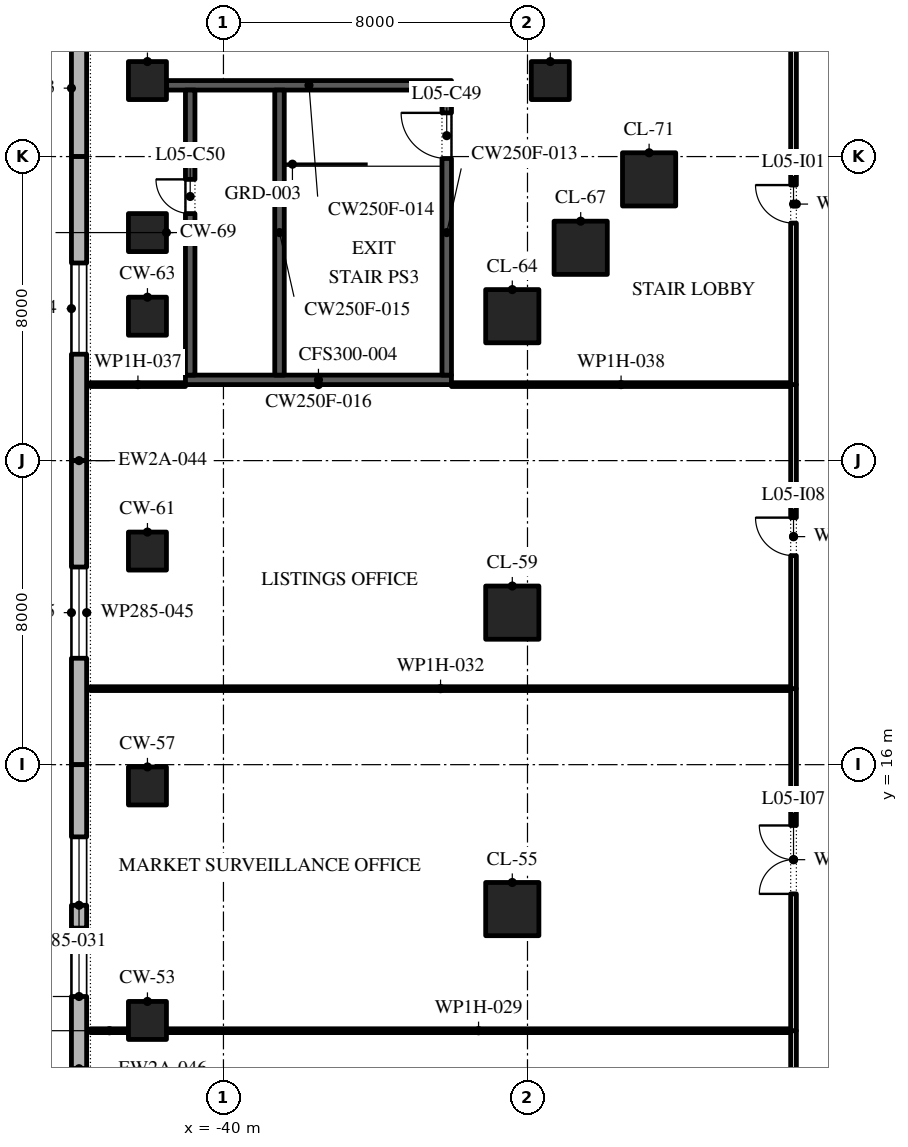
"""IFC4 building model, lengths in metres.
Left out: names, types, materials, properties, quantities, classifications, styles, units other than length and angle.
Written with IfcOpenShell. Run it as: python <this file> out.ifc"""

import sys

from ifc_helpers import new_model, si_unit, direction, frame, frame_2d, origin, origin_2d, place, context, subcontext, project, spatial, polyline, rectangle, outline, extrude, element, fill, save


model = new_model("IFC4")
c1 = context("Model", 3, precision=1e-05, world=origin(), true_north=direction((0.0, 1.0)))
c2 = subcontext(c1, "Body", "Model", "MODEL_VIEW")
j1 = project(units=[si_unit("LENGTHUNIT", "METRE"), si_unit("PLANEANGLEUNIT", "RADIAN")], contexts=[c1])
p1 = place(None, origin())
s1 = spatial("IfcSite", under=j1, at=p1, CompositionType="ELEMENT")
p2 = place(p1, origin())
s2 = spatial("IfcBuilding", under=s1, at=p2, CompositionType="ELEMENT")
p3 = place(p2, frame((0.0, 0.0, 28.8)))
s3 = spatial("IfcBuildingStorey", under=s2, at=p3, CompositionType="ELEMENT", Elevation=28.8)
p4 = place(p3, frame((-42.0, 9.27, 0.0), z_axis=(0.0, 0.0, 1.0), x_axis=(1.0, 0.0, 0.0)))
e1 = element("IfcColumn", 1, at=p4, inside=s3, PredefinedType="COLUMN", context=c2, shape_type="SweptSolid", body=[
    extrude(rectangle(XDim=1.0, YDim=1.0, at=origin_2d()), origin(), (0.0, 0.0, 1.0), 4.35),
])
p5 = place(p3, frame((-32.4, 12.2, 0.0), z_axis=(0.0, 0.0, 1.0), x_axis=(1.0, 0.0, 0.0)))
e2 = element("IfcColumn", 2, at=p5, inside=s3, PredefinedType="COLUMN", context=c2, shape_type="SweptSolid", body=[
    extrude(rectangle(XDim=1.4, YDim=1.4, at=origin_2d()), origin(), (0.0, 0.0, 1.0), 4.8),
])
p6 = place(p3, frame((-42.0, 15.44, 0.0), z_axis=(0.0, 0.0, 1.0), x_axis=(1.0, 0.0, 0.0)))
e3 = element("IfcColumn", 3, at=p6, inside=s3, PredefinedType="COLUMN", context=c2, shape_type="SweptSolid", body=[
    extrude(rectangle(XDim=1.0, YDim=1.0, at=origin_2d()), origin(), (0.0, 0.0, 1.0), 4.35),
])
p7 = place(p3, frame((-32.4, 20.0, 0.0), z_axis=(0.0, 0.0, 1.0), x_axis=(1.0, 0.0, 0.0)))
e4 = element("IfcColumn", 4, at=p7, inside=s3, PredefinedType="COLUMN", context=c2, shape_type="SweptSolid", body=[
    extrude(rectangle(XDim=1.4, YDim=1.4, at=origin_2d()), origin(), (0.0, 0.0, 1.0), 4.8),
])
for number, where, z_axis, x_axis in (
    (5, (-42.0, 21.62, 0.0), (0.0, 0.0, 1.0), (1.0, 0.0, 0.0)),
    (6, (-42.0, 27.8, 0.0), (0.0, 0.0, 1.0), (1.0, 0.0, 0.0)),
):
    element("IfcColumn", number, at=place(p3, frame(where, z_axis=z_axis, x_axis=x_axis)), inside=s3, PredefinedType="COLUMN", context=c2, shape_type="SweptSolid", body=[
        extrude(rectangle(XDim=1.0, YDim=1.0, at=origin_2d()), origin(), (0.0, 0.0, 1.0), 4.35),
    ])
for number, where, z_axis, x_axis in (
    (7, (-32.4, 27.8, 0.0), (0.0, 0.0, 1.0), (1.0, 0.0, 0.0)),
    (8, (-30.6, 29.6, 0.0), (0.0, 0.0, 1.0), (1.0, 0.0, 0.0)),
):
    element("IfcColumn", number, at=place(p3, frame(where, z_axis=z_axis, x_axis=x_axis)), inside=s3, PredefinedType="COLUMN", context=c2, shape_type="SweptSolid", body=[
        extrude(rectangle(XDim=1.4, YDim=1.4, at=origin_2d()), origin(), (0.0, 0.0, 1.0), 4.8),
    ])
p8 = place(p3, frame((-42.0, 30.0, 0.0), z_axis=(0.0, 0.0, 1.0), x_axis=(1.0, 0.0, 0.0)))
e9 = element("IfcColumn", 9, at=p8, inside=s3, PredefinedType="COLUMN", context=c2, shape_type="SweptSolid", body=[
    extrude(rectangle(XDim=1.0, YDim=1.0, at=origin_2d()), origin(), (0.0, 0.0, 1.0), 4.35),
])
p9 = place(p3, frame((-28.8, 31.4, 0.0), z_axis=(0.0, 0.0, 1.0), x_axis=(1.0, 0.0, 0.0)))
e10 = element("IfcColumn", 10, at=p9, inside=s3, PredefinedType="COLUMN", context=c2, shape_type="SweptSolid", body=[
    extrude(rectangle(XDim=1.4, YDim=1.4, at=origin_2d()), origin(), (0.0, 0.0, 1.0), 4.8),
])
for number, where, z_axis, x_axis in (
    (11, (-42.0, 34.0, 0.0), (0.0, 0.0, 1.0), (1.0, 0.0, 0.0)),
    (12, (-31.4, 34.0, 0.0), (0.0, 0.0, 1.0), (1.0, 0.0, 0.0)),
):
    element("IfcColumn", number, at=place(p3, frame(where, z_axis=z_axis, x_axis=x_axis)), inside=s3, PredefinedType="COLUMN", context=c2, shape_type="SweptSolid", body=[
        extrude(rectangle(XDim=1.0, YDim=1.0, at=origin_2d()), origin(), (0.0, 0.0, 1.0), 4.35),
    ])
p10 = place(p3, frame((-43.8, 35.6, 0.0), z_axis=(0.0, 0.0, 1.0), x_axis=(0.0, -1.0, 0.0)))
e13 = element("IfcWall", 13, at=p10, inside=s3, PredefinedType="STANDARD", context=c2, shape_type="SweptSolid", body=[
    extrude(rectangle(XDim=3.6, YDim=0.4, at=frame_2d((1.8, 0.0))), origin(), (0.0, 0.0, 1.0), 4.35),
])
p11 = place(p3, frame((-43.8, 32.0, 0.0), z_axis=(0.0, 0.0, 1.0), x_axis=(0.0, -1.0, 0.0)))
e14 = element("IfcWall", 14, at=p11, inside=s3, PredefinedType="STANDARD", context=c2, shape_type="SweptSolid", body=[
    extrude(rectangle(XDim=8.0, YDim=0.4, at=frame_2d((4.0, 0.0))), origin(), (0.0, 0.0, 1.0), 4.35),
])
p12 = place(p11, frame((2.8, 0.0, 0.9)))
e15 = element("IfcOpeningElement", 15, at=p12, cuts=e14, PredefinedType="OPENING", context=c2, shape_type="SweptSolid", body=[
    extrude(outline(polyline([(0.0, 0.0), (2.4, 0.0), (2.4, 1.425), (2.378, 1.677), (2.312, 1.921), (2.205, 2.15), (2.06, 2.356), (1.881, 2.535), (1.674, 2.679), (1.444, 2.785), (1.2, 2.85), (0.956, 2.785), (0.726, 2.679), (0.519, 2.535), (0.34, 2.356), (0.195, 2.15), (0.088, 1.921), (0.022, 1.677), (0.0, 1.425), (0.0, 0.0)])), frame((0.0, 0.21, 0.0), z_axis=(0.0, -1.0, 0.0), x_axis=(1.0, 0.0, 0.0)), (0.0, 0.0, 1.0), 0.42),
])
p13 = place(p3, frame((-43.8, 24.0, 0.0), z_axis=(0.0, 0.0, 1.0), x_axis=(0.0, -1.0, 0.0)))
e16 = element("IfcWall", 16, at=p13, inside=s3, PredefinedType="STANDARD", context=c2, shape_type="SweptSolid", body=[
    extrude(rectangle(XDim=8.0, YDim=0.4, at=frame_2d((4.0, 0.0))), origin(), (0.0, 0.0, 1.0), 4.35),
])
p14 = place(p13, frame((2.8, 0.0, 0.9)))
e17 = element("IfcOpeningElement", 17, at=p14, cuts=e16, PredefinedType="OPENING", context=c2, shape_type="SweptSolid", body=[
    extrude(outline(polyline([(0.0, 0.0), (2.4, 0.0), (2.4, 1.425), (2.378, 1.677), (2.312, 1.921), (2.205, 2.15), (2.06, 2.356), (1.881, 2.535), (1.674, 2.679), (1.444, 2.785), (1.2, 2.85), (0.956, 2.785), (0.726, 2.679), (0.519, 2.535), (0.34, 2.356), (0.195, 2.15), (0.088, 1.921), (0.022, 1.677), (0.0, 1.425), (0.0, 0.0)])), frame((0.0, 0.21, 0.0), z_axis=(0.0, -1.0, 0.0), x_axis=(1.0, 0.0, 0.0)), (0.0, 0.0, 1.0), 0.42),
])
p15 = place(p3, frame((-43.8, 16.0, 0.0), z_axis=(0.0, 0.0, 1.0), x_axis=(0.0, -1.0, 0.0)))
e18 = element("IfcWall", 18, at=p15, inside=s3, PredefinedType="STANDARD", context=c2, shape_type="SweptSolid", body=[
    extrude(rectangle(XDim=8.0, YDim=0.4, at=frame_2d((4.0, 0.0))), origin(), (0.0, 0.0, 1.0), 4.35),
])
p16 = place(p15, frame((1.9, 0.0, 0.9)))
e19 = element("IfcOpeningElement", 19, at=p16, cuts=e18, PredefinedType="OPENING", context=c2, shape_type="SweptSolid", body=[
    extrude(outline(polyline([(0.0, 0.0), (1.8, 0.0), (1.8, 1.425), (1.784, 1.646), (1.738, 1.864), (1.661, 2.072), (1.556, 2.268), (1.425, 2.447), (1.269, 2.605), (1.093, 2.741), (0.9, 2.85), (0.707, 2.741), (0.531, 2.605), (0.375, 2.447), (0.244, 2.268), (0.139, 2.072), (0.062, 1.864), (0.016, 1.646), (0.0, 1.425), (0.0, 0.0)])), frame((0.0, 0.21, 0.0), z_axis=(0.0, -1.0, 0.0), x_axis=(1.0, 0.0, 0.0)), (0.0, 0.0, 1.0), 0.42),
])
p17 = place(p15, frame((4.3, 0.0, 0.9)))
e20 = element("IfcOpeningElement", 20, at=p17, cuts=e18, PredefinedType="OPENING", context=c2, shape_type="SweptSolid", body=[
    extrude(outline(polyline([(0.0, 0.0), (1.8, 0.0), (1.8, 1.425), (1.784, 1.646), (1.738, 1.864), (1.661, 2.072), (1.556, 2.268), (1.425, 2.447), (1.269, 2.605), (1.093, 2.741), (0.9, 2.85), (0.707, 2.741), (0.531, 2.605), (0.375, 2.447), (0.244, 2.268), (0.139, 2.072), (0.062, 1.864), (0.016, 1.646), (0.0, 1.425), (0.0, 0.0)])), frame((0.0, 0.21, 0.0), z_axis=(0.0, -1.0, 0.0), x_axis=(1.0, 0.0, 0.0)), (0.0, 0.0, 1.0), 0.42),
])
p18 = place(p3, frame((-41.0, 26.125, 0.0), z_axis=(0.0, 0.0, 1.0), x_axis=(1.0, 0.0, 0.0)))
e21 = element("IfcWall", 21, at=p18, inside=s3, PredefinedType="SHEAR", context=c2, shape_type="SweptSolid", body=[
    extrude(rectangle(XDim=7.0, YDim=0.25, at=frame_2d((3.5, 0.0))), origin(), (0.0, 0.0, 1.0), 4.35),
])
p19 = place(p3, frame((-41.5, 33.875, 0.0), z_axis=(0.0, 0.0, 1.0), x_axis=(1.0, 0.0, 0.0)))
e22 = element("IfcWall", 22, at=p19, inside=s3, PredefinedType="SHEAR", context=c2, shape_type="SweptSolid", body=[
    extrude(rectangle(XDim=7.5, YDim=0.25, at=frame_2d((3.75, 0.0))), origin(), (0.0, 0.0, 1.0), 4.35),
])
p20 = place(p3, frame((-40.875, 26.25, 0.0), z_axis=(0.0, 0.0, 1.0), x_axis=(0.0, 1.0, 0.0)))
e23 = element("IfcWall", 23, at=p20, inside=s3, PredefinedType="SHEAR", context=c2, shape_type="SweptSolid", body=[
    extrude(rectangle(XDim=7.5, YDim=0.25, at=frame_2d((3.75, 0.0))), origin(), (0.0, 0.0, 1.0), 4.35),
])
p21 = place(p20, frame((4.25, 0.0, 0.0)))
e24 = element("IfcOpeningElement", 24, at=p21, cuts=e23, PredefinedType="OPENING", context=c2, shape_type="SweptSolid", body=[
    extrude(rectangle(XDim=0.9, YDim=2.1, at=frame_2d((0.45, 1.05))), frame((0.0, 0.135, 0.0), z_axis=(0.0, -1.0, 0.0), x_axis=(1.0, 0.0, 0.0)), (0.0, 0.0, 1.0), 0.27),
])
p22 = place(p3, frame((-34.125, 26.25, 0.0), z_axis=(0.0, 0.0, 1.0), x_axis=(0.0, 1.0, 0.0)))
e25 = element("IfcWall", 25, at=p22, inside=s3, PredefinedType="SHEAR", context=c2, shape_type="SweptSolid", body=[
    extrude(rectangle(XDim=7.5, YDim=0.25, at=frame_2d((3.75, 0.0))), origin(), (0.0, 0.0, 1.0), 4.35),
])
p23 = place(p22, frame((5.7, 0.0, 0.0)))
e26 = element("IfcOpeningElement", 26, at=p23, cuts=e25, PredefinedType="OPENING", context=c2, shape_type="SweptSolid", body=[
    extrude(rectangle(XDim=1.2, YDim=2.1, at=frame_2d((0.6, 1.05))), frame((0.0, 0.135, 0.0), z_axis=(0.0, -1.0, 0.0), x_axis=(1.0, 0.0, 0.0)), (0.0, 0.0, 1.0), 0.27),
])
p24 = place(p3, frame((-38.525, 26.25, 0.0), z_axis=(0.0, 0.0, 1.0), x_axis=(0.0, 1.0, 0.0)))
e27 = element("IfcWall", 27, at=p24, inside=s3, PredefinedType="SHEAR", context=c2, shape_type="SweptSolid", body=[
    extrude(rectangle(XDim=7.5, YDim=0.25, at=frame_2d((3.75, 0.0))), origin(), (0.0, 0.0, 1.0), 4.35),
])
p25 = place(p3, frame((-43.5, 9.0, 0.0), z_axis=(0.0, 0.0, 1.0), x_axis=(1.0, 0.0, 0.0)))
e28 = element("IfcWall", 28, at=p25, inside=s3, PredefinedType="PARTITIONING", context=c2, shape_type="SweptSolid", body=[
    extrude(rectangle(XDim=1.0, YDim=0.1, at=frame_2d((0.5, 0.0))), origin(), (0.0, 0.0, 1.0), 4.35),
])
p26 = place(p3, frame((-41.5, 9.0, 0.0), z_axis=(0.0, 0.0, 1.0), x_axis=(1.0, 0.0, 0.0)))
e29 = element("IfcWall", 29, at=p26, inside=s3, PredefinedType="PARTITIONING", context=c2, shape_type="SweptSolid", body=[
    extrude(rectangle(XDim=16.425, YDim=0.1, at=frame_2d((8.212, 0.0))), origin(), (0.0, 0.0, 1.0), 4.35),
])
p27 = place(p3, frame((-43.5, 18.0, 0.0), z_axis=(0.0, 0.0, 1.0), x_axis=(1.0, 0.0, 0.0)))
e30 = element("IfcWall", 30, at=p27, inside=s3, PredefinedType="PARTITIONING", context=c2, shape_type="SweptSolid", body=[
    extrude(rectangle(XDim=18.425, YDim=0.1, at=frame_2d((9.212, 0.0))), origin(), (0.0, 0.0, 1.0), 4.35),
])
p28 = place(p3, frame((-43.5, 26.0, 0.0), z_axis=(0.0, 0.0, 1.0), x_axis=(1.0, 0.0, 0.0)))
e31 = element("IfcWall", 31, at=p28, inside=s3, PredefinedType="PARTITIONING", context=c2, shape_type="SweptSolid", body=[
    extrude(rectangle(XDim=2.5, YDim=0.1, at=frame_2d((1.25, 0.0))), origin(), (0.0, 0.0, 1.0), 4.35),
])
p29 = place(p3, frame((-34.0, 26.0, 0.0), z_axis=(0.0, 0.0, 1.0), x_axis=(1.0, 0.0, 0.0)))
e32 = element("IfcWall", 32, at=p29, inside=s3, PredefinedType="PARTITIONING", context=c2, shape_type="SweptSolid", body=[
    extrude(rectangle(XDim=8.925, YDim=0.1, at=frame_2d((4.462, 0.0))), origin(), (0.0, 0.0, 1.0), 4.35),
])
p30 = place(p3, frame((-25.0, -1.0, 0.0), z_axis=(0.0, 0.0, 1.0), x_axis=(0.0, 1.0, 0.0)))
e33 = element("IfcWall", 33, at=p30, inside=s3, PredefinedType="PARTITIONING", context=c2, shape_type="SweptSolid", body=[
    extrude(rectangle(XDim=10.0, YDim=0.15, at=frame_2d((5.0, 0.0))), origin(), (0.0, 0.0, 1.0), 4.35),
])
p31 = place(p30, frame((4.1, 0.0, 0.0)))
e34 = element("IfcOpeningElement", 34, at=p31, cuts=e33, PredefinedType="OPENING", context=c2, shape_type="SweptSolid", body=[
    extrude(rectangle(XDim=1.8, YDim=2.1, at=frame_2d((0.9, 1.05))), frame((0.0, 0.085, 0.0), z_axis=(0.0, -1.0, 0.0), x_axis=(1.0, 0.0, 0.0)), (0.0, 0.0, 1.0), 0.17),
])
p32 = place(p3, frame((-25.0, 9.0, 0.0), z_axis=(0.0, 0.0, 1.0), x_axis=(0.0, 1.0, 0.0)))
e35 = element("IfcWall", 35, at=p32, inside=s3, PredefinedType="PARTITIONING", context=c2, shape_type="SweptSolid", body=[
    extrude(rectangle(XDim=9.0, YDim=0.15, at=frame_2d((4.5, 0.0))), origin(), (0.0, 0.0, 1.0), 4.35),
])
p33 = place(p32, frame((3.6, 0.0, 0.0)))
e36 = element("IfcOpeningElement", 36, at=p33, cuts=e35, PredefinedType="OPENING", context=c2, shape_type="SweptSolid", body=[
    extrude(rectangle(XDim=1.8, YDim=2.1, at=frame_2d((0.9, 1.05))), frame((0.0, 0.085, 0.0), z_axis=(0.0, -1.0, 0.0), x_axis=(1.0, 0.0, 0.0)), (0.0, 0.0, 1.0), 0.17),
])
p34 = place(p3, frame((-25.0, 18.0, 0.0), z_axis=(0.0, 0.0, 1.0), x_axis=(0.0, 1.0, 0.0)))
e37 = element("IfcWall", 37, at=p34, inside=s3, PredefinedType="PARTITIONING", context=c2, shape_type="SweptSolid", body=[
    extrude(rectangle(XDim=8.0, YDim=0.15, at=frame_2d((4.0, 0.0))), origin(), (0.0, 0.0, 1.0), 4.35),
])
p35 = place(p34, frame((3.5, 0.0, 0.0)))
e38 = element("IfcOpeningElement", 38, at=p35, cuts=e37, PredefinedType="OPENING", context=c2, shape_type="SweptSolid", body=[
    extrude(rectangle(XDim=1.0, YDim=2.1, at=frame_2d((0.5, 1.05))), frame((0.0, 0.085, 0.0), z_axis=(0.0, -1.0, 0.0), x_axis=(1.0, 0.0, 0.0)), (0.0, 0.0, 1.0), 0.17),
])
p36 = place(p3, frame((-25.0, 26.0, 0.0), z_axis=(0.0, 0.0, 1.0), x_axis=(0.0, 1.0, 0.0)))
e39 = element("IfcWall", 39, at=p36, inside=s3, PredefinedType="PARTITIONING", context=c2, shape_type="SweptSolid", body=[
    extrude(rectangle(XDim=9.5, YDim=0.15, at=frame_2d((4.75, 0.0))), origin(), (0.0, 0.0, 1.0), 4.35),
])
p37 = place(p36, frame((4.25, 0.0, 0.0)))
e40 = element("IfcOpeningElement", 40, at=p37, cuts=e39, PredefinedType="OPENING", context=c2, shape_type="SweptSolid", body=[
    extrude(rectangle(XDim=1.0, YDim=2.1, at=frame_2d((0.5, 1.05))), frame((0.0, 0.085, 0.0), z_axis=(0.0, -1.0, 0.0), x_axis=(1.0, 0.0, 0.0)), (0.0, 0.0, 1.0), 0.17),
])
p38 = place(p12, origin())
e41 = element("IfcWindow", 41, at=p38, inside=s3, PartitioningType="DOUBLE_PANEL_VERTICAL", PredefinedType="WINDOW", context=c2, shape_type="SweptSolid", body=[
    extrude(outline(polyline([(0.0, 0.0), (2.4, 0.0), (2.4, 1.425), (2.378, 1.677), (2.312, 1.921), (2.205, 2.15), (2.06, 2.356), (1.881, 2.535), (1.674, 2.679), (1.444, 2.785), (1.2, 2.85), (0.956, 2.785), (0.726, 2.679), (0.519, 2.535), (0.34, 2.356), (0.195, 2.15), (0.088, 1.921), (0.022, 1.677), (0.0, 1.425), (0.0, 0.0)])), frame((0.0, 0.03, 0.0), z_axis=(0.0, -1.0, 0.0), x_axis=(1.0, 0.0, 0.0)), (0.0, 0.0, 1.0), 0.06),
])
fill(e15, e41)
p39 = place(p14, origin())
e42 = element("IfcWindow", 42, at=p39, inside=s3, PartitioningType="DOUBLE_PANEL_VERTICAL", PredefinedType="WINDOW", context=c2, shape_type="SweptSolid", body=[
    extrude(outline(polyline([(0.0, 0.0), (2.4, 0.0), (2.4, 1.425), (2.378, 1.677), (2.312, 1.921), (2.205, 2.15), (2.06, 2.356), (1.881, 2.535), (1.674, 2.679), (1.444, 2.785), (1.2, 2.85), (0.956, 2.785), (0.726, 2.679), (0.519, 2.535), (0.34, 2.356), (0.195, 2.15), (0.088, 1.921), (0.022, 1.677), (0.0, 1.425), (0.0, 0.0)])), frame((0.0, 0.03, 0.0), z_axis=(0.0, -1.0, 0.0), x_axis=(1.0, 0.0, 0.0)), (0.0, 0.0, 1.0), 0.06),
])
fill(e17, e42)
p40 = place(p16, origin())
e43 = element("IfcWindow", 43, at=p40, inside=s3, PartitioningType="DOUBLE_PANEL_VERTICAL", PredefinedType="WINDOW", context=c2, shape_type="SweptSolid", body=[
    extrude(outline(polyline([(0.0, 0.0), (1.8, 0.0), (1.8, 1.425), (1.784, 1.646), (1.738, 1.864), (1.661, 2.072), (1.556, 2.268), (1.425, 2.447), (1.269, 2.605), (1.093, 2.741), (0.9, 2.85), (0.707, 2.741), (0.531, 2.605), (0.375, 2.447), (0.244, 2.268), (0.139, 2.072), (0.062, 1.864), (0.016, 1.646), (0.0, 1.425), (0.0, 0.0)])), frame((0.0, 0.03, 0.0), z_axis=(0.0, -1.0, 0.0), x_axis=(1.0, 0.0, 0.0)), (0.0, 0.0, 1.0), 0.06),
])
fill(e19, e43)
p41 = place(p17, origin())
e44 = element("IfcWindow", 44, at=p41, inside=s3, PartitioningType="DOUBLE_PANEL_VERTICAL", PredefinedType="WINDOW", context=c2, shape_type="SweptSolid", body=[
    extrude(outline(polyline([(0.0, 0.0), (1.8, 0.0), (1.8, 1.425), (1.784, 1.646), (1.738, 1.864), (1.661, 2.072), (1.556, 2.268), (1.425, 2.447), (1.269, 2.605), (1.093, 2.741), (0.9, 2.85), (0.707, 2.741), (0.531, 2.605), (0.375, 2.447), (0.244, 2.268), (0.139, 2.072), (0.062, 1.864), (0.016, 1.646), (0.0, 1.425), (0.0, 0.0)])), frame((0.0, 0.03, 0.0), z_axis=(0.0, -1.0, 0.0), x_axis=(1.0, 0.0, 0.0)), (0.0, 0.0, 1.0), 0.06),
])
fill(e20, e44)
p42 = place(p23, origin())
e45 = element("IfcDoor", 45, at=p42, inside=s3, OperationType="SINGLE_SWING_LEFT", PredefinedType="DOOR", context=c2, shape_type="SweptSolid", body=[
    extrude(rectangle(XDim=1.2, YDim=2.1, at=frame_2d((0.6, 1.05))), frame((0.0, 0.025, 0.0), z_axis=(0.0, -1.0, 0.0), x_axis=(1.0, 0.0, 0.0)), (0.0, 0.0, 1.0), 0.05),
])
fill(e26, e45)
p43 = place(p21, origin())
e46 = element("IfcDoor", 46, at=p43, inside=s3, OperationType="SINGLE_SWING_LEFT", PredefinedType="DOOR", context=c2, shape_type="SweptSolid", body=[
    extrude(rectangle(XDim=0.9, YDim=2.1, at=frame_2d((0.45, 1.05))), frame((0.0, -0.075, 0.0), z_axis=(0.0, -1.0, 0.0), x_axis=(1.0, 0.0, 0.0)), (0.0, 0.0, 1.0), 0.05),
])
fill(e24, e46)
p44 = place(p37, origin())
e47 = element("IfcDoor", 47, at=p44, inside=s3, OperationType="SINGLE_SWING_LEFT", PredefinedType="DOOR", context=c2, shape_type="SweptSolid", body=[
    extrude(rectangle(XDim=1.0, YDim=2.1, at=frame_2d((0.5, 1.05))), frame((0.0, 0.025, 0.0), z_axis=(0.0, -1.0, 0.0), x_axis=(1.0, 0.0, 0.0)), (0.0, 0.0, 1.0), 0.05),
])
fill(e40, e47)
p45 = place(p33, origin())
e48 = element("IfcDoor", 48, at=p45, inside=s3, OperationType="SINGLE_SWING_RIGHT", PredefinedType="DOOR", context=c2, shape_type="SweptSolid", body=[
    extrude(rectangle(XDim=1.8, YDim=2.1, at=frame_2d((0.9, 1.05))), frame((0.0, 0.025, 0.0), z_axis=(0.0, -1.0, 0.0), x_axis=(1.0, 0.0, 0.0)), (0.0, 0.0, 1.0), 0.05),
])
fill(e36, e48)
p46 = place(p35, origin())
e49 = element("IfcDoor", 49, at=p46, inside=s3, OperationType="SINGLE_SWING_LEFT", PredefinedType="DOOR", context=c2, shape_type="SweptSolid", body=[
    extrude(rectangle(XDim=1.0, YDim=2.1, at=frame_2d((0.5, 1.05))), frame((0.0, 0.025, 0.0), z_axis=(0.0, -1.0, 0.0), x_axis=(1.0, 0.0, 0.0)), (0.0, 0.0, 1.0), 0.05),
])
fill(e38, e49)
save(model, sys.argv[1])
